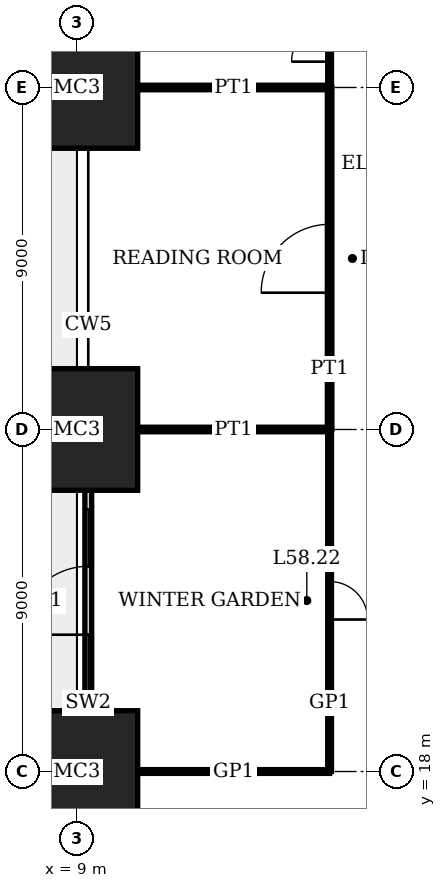
"""IFC4 building model, lengths in metres.
Left out: names, types, materials, properties, quantities, classifications, styles, units other than length and angle.
Written with IfcOpenShell. Run it as: python <this file> out.ifc"""

import sys

from ifc_helpers import new_model, si_unit, direction, frame, frame_2d, origin, origin_2d, place, context, subcontext, project, spatial, rectangle, extrude, element, fill, save


model = new_model("IFC4")
c1 = context("Model", 3, precision=1e-05, world=origin(), true_north=direction((0.0, 1.0)))
c2 = subcontext(c1, "Body", "Model", "MODEL_VIEW")
j1 = project(units=[si_unit("LENGTHUNIT", "METRE"), si_unit("PLANEANGLEUNIT", "RADIAN")], contexts=[c1])
p1 = place(None, origin())
s1 = spatial("IfcSite", under=j1, at=p1, CompositionType="ELEMENT")
p2 = place(p1, origin())
s2 = spatial("IfcBuilding", under=s1, at=p2, CompositionType="ELEMENT")
p3 = place(p2, frame((0.0, 0.0, 239.4)))
s3 = spatial("IfcBuildingStorey", under=s2, at=p3, CompositionType="ELEMENT", Elevation=239.4)
for number, where, z_axis, x_axis in (
    (1, (9.0, 18.0, 0.0), (0.0, 0.0, 1.0), (1.0, 0.0, 0.0)),
    (2, (9.0, 27.0, 0.0), (0.0, 0.0, 1.0), (1.0, 0.0, 0.0)),
    (3, (9.0, 36.0, 0.0), (0.0, 0.0, 1.0), (1.0, 0.0, 0.0)),
):
    element("IfcColumn", number, at=place(p3, frame(where, z_axis=z_axis, x_axis=x_axis)), inside=s3, PredefinedType="COLUMN", context=c2, shape_type="SweptSolid", body=[
        extrude(rectangle(XDim=3.2, YDim=3.2, at=origin_2d()), origin(), (0.0, 0.0, 1.0), 4.0),
    ])
p4 = place(p3, frame((9.3, 19.6, 0.0), z_axis=(0.0, 0.0, 1.0), x_axis=(0.0, 1.0, 0.0)))
e4 = element("IfcWall", 4, at=p4, inside=s3, PredefinedType="SOLIDWALL", context=c2, shape_type="SweptSolid", body=[
    extrude(rectangle(XDim=5.8, YDim=0.18, at=frame_2d((2.9, 0.0))), origin(), (0.0, 0.0, 1.0), 2.95),
])
p5 = place(p4, frame((2.0, 0.0, 0.0)))
e5 = element("IfcOpeningElement", 5, at=p5, cuts=e4, PredefinedType="OPENING", context=c2, shape_type="SweptSolid", body=[
    extrude(rectangle(XDim=1.8, YDim=2.7, at=frame_2d((0.9, 1.35))), frame((0.0, 0.1, 0.0), z_axis=(0.0, -1.0, 0.0), x_axis=(1.0, 0.0, 0.0)), (0.0, 0.0, 1.0), 0.2),
])
p6 = place(p4, frame((0.5, 0.0, 0.3)))
e6 = element("IfcOpeningElement", 6, at=p6, cuts=e4, PredefinedType="OPENING", context=c2, shape_type="SweptSolid", body=[
    extrude(rectangle(XDim=1.5, YDim=2.4, at=frame_2d((0.75, 1.2))), frame((0.0, 0.1, 0.0), z_axis=(0.0, -1.0, 0.0), x_axis=(1.0, 0.0, 0.0)), (0.0, 0.0, 1.0), 0.2),
])
p7 = place(p4, frame((3.8, 0.0, 0.3)))
e7 = element("IfcOpeningElement", 7, at=p7, cuts=e4, PredefinedType="OPENING", context=c2, shape_type="SweptSolid", body=[
    extrude(rectangle(XDim=1.5, YDim=2.4, at=frame_2d((0.75, 1.2))), frame((0.0, 0.1, 0.0), z_axis=(0.0, -1.0, 0.0), x_axis=(1.0, 0.0, 0.0)), (0.0, 0.0, 1.0), 0.2),
])
p8 = place(p3, frame((10.6, 18.0, 0.0), z_axis=(0.0, 0.0, 1.0), x_axis=(1.0, 0.0, 0.0)))
e8 = element("IfcWall", 8, at=p8, inside=s3, PredefinedType="PARTITIONING", context=c2, shape_type="SweptSolid", body=[
    extrude(rectangle(XDim=5.05, YDim=0.1, at=frame_2d((2.525, 0.0))), origin(), (0.0, 0.0, 1.0), 3.05),
])
for number, where, z_axis, x_axis in (
    (9, (10.6, 27.0, 0.0), (0.0, 0.0, 1.0), (1.0, 0.0, 0.0)),
    (10, (10.6, 36.0, 0.0), (0.0, 0.0, 1.0), (1.0, 0.0, 0.0)),
):
    element("IfcWall", number, at=place(p3, frame(where, z_axis=z_axis, x_axis=x_axis)), inside=s3, PredefinedType="PARTITIONING", context=c2, shape_type="SweptSolid", body=[
        extrude(rectangle(XDim=5.05, YDim=0.12, at=frame_2d((2.525, 0.0))), origin(), (0.0, 0.0, 1.0), 3.05),
    ])
p9 = place(p3, frame((15.65, 27.0, 0.0), z_axis=(0.0, 0.0, 1.0), x_axis=(0.0, 1.0, 0.0)))
e11 = element("IfcWall", 11, at=p9, inside=s3, PredefinedType="PARTITIONING", context=c2, shape_type="SweptSolid", body=[
    extrude(rectangle(XDim=9.0, YDim=0.12, at=frame_2d((4.5, 0.0))), origin(), (0.0, 0.0, 1.0), 3.75),
])
p10 = place(p9, frame((3.6, 0.0, 0.0)))
e12 = element("IfcOpeningElement", 12, at=p10, cuts=e11, PredefinedType="OPENING", context=c2, shape_type="SweptSolid", body=[
    extrude(rectangle(XDim=1.8, YDim=2.4, at=frame_2d((0.9, 1.2))), frame((0.0, 0.07, 0.0), z_axis=(0.0, -1.0, 0.0), x_axis=(1.0, 0.0, 0.0)), (0.0, 0.0, 1.0), 0.14),
])
p11 = place(p3, frame((15.65, 36.01, 0.0), z_axis=(0.0, 0.0, 1.0), x_axis=(0.0, 1.0, 0.0)))
e13 = element("IfcWall", 13, at=p11, inside=s3, PredefinedType="PARTITIONING", context=c2, shape_type="SweptSolid", body=[
    extrude(rectangle(XDim=2.34, YDim=0.1, at=frame_2d((1.17, 0.0))), origin(), (0.0, 0.0, 1.0), 3.75),
])
p12 = place(p11, frame((0.67, 0.0, 0.0)))
e14 = element("IfcOpeningElement", 14, at=p12, cuts=e13, PredefinedType="OPENING", context=c2, shape_type="SweptSolid", body=[
    extrude(rectangle(XDim=1.0, YDim=2.4, at=frame_2d((0.5, 1.2))), frame((0.0, 0.06, 0.0), z_axis=(0.0, -1.0, 0.0), x_axis=(1.0, 0.0, 0.0)), (0.0, 0.0, 1.0), 0.12),
])
p13 = place(p3, frame((15.65, 18.0, 0.0), z_axis=(0.0, 0.0, 1.0), x_axis=(0.0, 1.0, 0.0)))
e15 = element("IfcWall", 15, at=p13, inside=s3, PredefinedType="PARTITIONING", context=c2, shape_type="SweptSolid", body=[
    extrude(rectangle(XDim=9.0, YDim=0.1, at=frame_2d((4.5, 0.0))), origin(), (0.0, 0.0, 1.0), 3.75),
])
p14 = place(p13, frame((4.0, 0.0, 0.0)))
e16 = element("IfcOpeningElement", 16, at=p14, cuts=e15, PredefinedType="OPENING", context=c2, shape_type="SweptSolid", body=[
    extrude(rectangle(XDim=1.0, YDim=2.4, at=frame_2d((0.5, 1.2))), frame((0.0, 0.06, 0.0), z_axis=(0.0, -1.0, 0.0), x_axis=(1.0, 0.0, 0.0)), (0.0, 0.0, 1.0), 0.12),
])
p15 = place(p5, origin())
e17 = element("IfcDoor", 17, at=p15, inside=s3, OperationType="DOUBLE_DOOR_SINGLE_SWING", PredefinedType="DOOR", context=c2, shape_type="SweptSolid", body=[
    extrude(rectangle(XDim=1.8, YDim=2.7, at=frame_2d((0.9, 1.35))), frame((0.0, 0.035, 0.0), z_axis=(0.0, -1.0, 0.0), x_axis=(1.0, 0.0, 0.0)), (0.0, 0.0, 1.0), 0.07),
])
fill(e5, e17)
p16 = place(p6, origin())
e18 = element("IfcWindow", 18, at=p16, inside=s3, PartitioningType="SINGLE_PANEL", PredefinedType="WINDOW", context=c2, shape_type="SweptSolid", body=[
    extrude(rectangle(XDim=1.5, YDim=2.4, at=frame_2d((0.75, 1.2))), frame((0.0, 0.03, 0.0), z_axis=(0.0, -1.0, 0.0), x_axis=(1.0, 0.0, 0.0)), (0.0, 0.0, 1.0), 0.06),
])
fill(e6, e18)
p17 = place(p7, origin())
e19 = element("IfcWindow", 19, at=p17, inside=s3, PartitioningType="SINGLE_PANEL", PredefinedType="WINDOW", context=c2, shape_type="SweptSolid", body=[
    extrude(rectangle(XDim=1.5, YDim=2.4, at=frame_2d((0.75, 1.2))), frame((0.0, 0.03, 0.0), z_axis=(0.0, -1.0, 0.0), x_axis=(1.0, 0.0, 0.0)), (0.0, 0.0, 1.0), 0.06),
])
fill(e7, e19)
p18 = place(p10, origin())
e20 = element("IfcDoor", 20, at=p18, inside=s3, OperationType="DOUBLE_DOOR_SINGLE_SWING", PredefinedType="DOOR", context=c2, shape_type="SweptSolid", body=[
    extrude(rectangle(XDim=1.8, YDim=2.4, at=frame_2d((0.9, 1.2))), frame((0.0, 0.025, 0.0), z_axis=(0.0, -1.0, 0.0), x_axis=(1.0, 0.0, 0.0)), (0.0, 0.0, 1.0), 0.05),
])
fill(e12, e20)
p19 = place(p12, origin())
e21 = element("IfcDoor", 21, at=p19, inside=s3, OperationType="SINGLE_SWING_RIGHT", PredefinedType="DOOR", context=c2, shape_type="SweptSolid", body=[
    extrude(rectangle(XDim=1.0, YDim=2.4, at=frame_2d((0.5, 1.2))), frame((0.0, 0.02, 0.0), z_axis=(0.0, -1.0, 0.0), x_axis=(1.0, 0.0, 0.0)), (0.0, 0.0, 1.0), 0.04),
])
fill(e14, e21)
p20 = place(p14, origin())
e22 = element("IfcDoor", 22, at=p20, inside=s3, OperationType="SINGLE_SWING_LEFT", PredefinedType="DOOR", context=c2, shape_type="SweptSolid", body=[
    extrude(rectangle(XDim=1.0, YDim=2.4, at=frame_2d((0.5, 1.2))), frame((0.0, 0.02, 0.0), z_axis=(0.0, -1.0, 0.0), x_axis=(1.0, 0.0, 0.0)), (0.0, 0.0, 1.0), 0.04),
])
fill(e16, e22)
save(model, sys.argv[1])
